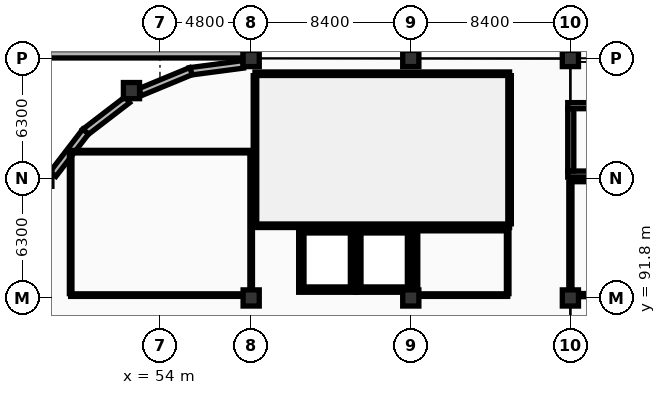
"""IFC4 building model, lengths in metres.
Left out: names, types, materials, properties, quantities, classifications, styles, units other than length and angle.
Written with IfcOpenShell. Run it as: python <this file> out.ifc"""

import sys

from ifc_helpers import new_model, si_unit, direction, frame, frame_2d, origin, origin_2d, place, context, subcontext, project, spatial, rectangle, circle, extrude, element, fill, save


model = new_model("IFC4")
c1 = context("Model", 3, precision=1e-05, world=origin(), true_north=direction((0.0, 1.0)))
c2 = subcontext(c1, "Body", "Model", "MODEL_VIEW")
j1 = project(units=[si_unit("LENGTHUNIT", "METRE"), si_unit("PLANEANGLEUNIT", "RADIAN")], contexts=[c1])
p1 = place(None, origin())
s1 = spatial("IfcSite", under=j1, at=p1, CompositionType="ELEMENT")
p2 = place(p1, origin())
s2 = spatial("IfcBuilding", under=s1, at=p2, CompositionType="ELEMENT")
p3 = place(p2, frame((0.0, 0.0, 5.4)))
s3 = spatial("IfcBuildingStorey", under=s2, at=p3, CompositionType="ELEMENT", Elevation=5.4)
for number, where, z_axis, x_axis in (
    (1, (58.8, 91.8, 0.0), (0.0, 0.0, 1.0), (1.0, 0.0, 0.0)),
    (2, (58.8, 104.4, 0.0), (0.0, 0.0, 1.0), (1.0, 0.0, 0.0)),
    (3, (67.2, 91.8, 0.0), (0.0, 0.0, 1.0), (1.0, 0.0, 0.0)),
    (4, (67.2, 104.4, 0.0), (0.0, 0.0, 1.0), (1.0, 0.0, 0.0)),
    (5, (75.6, 91.8, 0.0), (0.0, 0.0, 1.0), (1.0, 0.0, 0.0)),
    (6, (75.6, 104.4, 0.0), (0.0, 0.0, 1.0), (1.0, 0.0, 0.0)),
):
    element("IfcColumn", number, at=place(p3, frame(where, z_axis=z_axis, x_axis=x_axis)), inside=s3, PredefinedType="COLUMN", context=c2, shape_type="SweptSolid", body=[
        extrude(rectangle(XDim=0.85, YDim=0.85, at=origin_2d()), origin(), (0.0, 0.0, 1.0), 4.5),
    ])
for number, where, z_axis, x_axis in (
    (7, (52.5, 102.712, 0.0), (0.0, 0.0, 1.0), (1.0, 0.0, 0.0)),
    (8, (47.888, 98.1, 0.0), (0.0, 0.0, 1.0), (1.0, 0.0, 0.0)),
):
    element("IfcColumn", number, at=place(p3, frame(where, z_axis=z_axis, x_axis=x_axis)), inside=s3, PredefinedType="COLUMN", context=c2, shape_type="SweptSolid", body=[
        extrude(circle(Radius=0.425, at=origin_2d()), origin(), (0.0, 0.0, 1.0), 4.5),
    ])
p4 = place(p3, frame((58.383, 104.65, 0.0), z_axis=(0.0, 0.0, 1.0), x_axis=(-1.0, 0.0, 0.0)))
e9 = element("IfcWall", 9, at=p4, inside=s3, PredefinedType="STANDARD", context=c2, shape_type="SweptSolid", body=[
    extrude(rectangle(XDim=11.683, YDim=0.44, at=frame_2d((5.842, 0.0))), origin(), (0.0, 0.0, 1.0), 3.32),
])
p5 = place(p4, frame((2.658, 0.0, 0.9)))
e10 = element("IfcOpeningElement", 10, at=p5, cuts=e9, PredefinedType="OPENING", context=c2, shape_type="SweptSolid", body=[
    extrude(rectangle(XDim=1.2, YDim=1.85, at=frame_2d((0.6, 0.925))), frame((0.0, 0.23, 0.0), z_axis=(0.0, -1.0, 0.0), x_axis=(1.0, 0.0, 0.0)), (0.0, 0.0, 1.0), 0.46),
])
p6 = place(p4, frame((7.908, 0.0, 0.9)))
e11 = element("IfcOpeningElement", 11, at=p6, cuts=e9, PredefinedType="OPENING", context=c2, shape_type="SweptSolid", body=[
    extrude(rectangle(XDim=1.2, YDim=1.85, at=frame_2d((0.6, 0.925))), frame((0.0, 0.23, 0.0), z_axis=(0.0, -1.0, 0.0), x_axis=(1.0, 0.0, 0.0)), (0.0, 0.0, 1.0), 0.46),
])
p7 = place(p3, frame((58.372, 104.091, 0.0), z_axis=(0.0, 0.0, 1.0), x_axis=(-0.991455178228, -0.130447803989, 0.0)))
e12 = element("IfcWall", 12, at=p7, inside=s3, PredefinedType="ELEMENTEDWALL", context=c2, shape_type="SweptSolid", body=[
    extrude(rectangle(XDim=2.824, YDim=0.395, at=frame_2d((1.412, 0.0))), origin(), (0.0, 0.0, 1.0), 3.37),
])
p8 = place(p7, frame((0.962, 0.0, 0.85)))
e13 = element("IfcOpeningElement", 13, at=p8, cuts=e12, PredefinedType="OPENING", context=c2, shape_type="SweptSolid", body=[
    extrude(rectangle(XDim=0.9, YDim=1.85, at=frame_2d((0.45, 0.925))), frame((0.0, 0.208, 0.0), z_axis=(0.0, -1.0, 0.0), x_axis=(1.0, 0.0, 0.0)), (0.0, 0.0, 1.0), 0.415),
])
p9 = place(p3, frame((55.635, 103.74, 0.0), z_axis=(0.0, 0.0, 1.0), x_axis=(-0.923866622923, -0.382714597381, 0.0)))
e14 = element("IfcWall", 14, at=p9, inside=s3, PredefinedType="ELEMENTEDWALL", context=c2, shape_type="SweptSolid", body=[
    extrude(rectangle(XDim=2.892, YDim=0.395, at=frame_2d((1.446, 0.0))), origin(), (0.0, 0.0, 1.0), 3.27),
])
p10 = place(p9, frame((0.962, 0.0, 0.85)))
e15 = element("IfcOpeningElement", 15, at=p10, cuts=e14, PredefinedType="OPENING", context=c2, shape_type="SweptSolid", body=[
    extrude(rectangle(XDim=0.9, YDim=1.85, at=frame_2d((0.45, 0.925))), frame((0.0, 0.208, 0.0), z_axis=(0.0, -1.0, 0.0), x_axis=(1.0, 0.0, 0.0)), (0.0, 0.0, 1.0), 0.415),
])
p11 = place(p3, frame((52.283, 102.23, 0.0), z_axis=(0.0, 0.0, 1.0), x_axis=(-0.793343310116, -0.608774500364, 0.0)))
e16 = element("IfcWall", 16, at=p11, inside=s3, PredefinedType="ELEMENTEDWALL", context=c2, shape_type="SweptSolid", body=[
    extrude(rectangle(XDim=2.824, YDim=0.395, at=frame_2d((1.412, 0.0))), origin(), (0.0, 0.0, 1.0), 3.27),
])
p12 = place(p11, frame((0.962, 0.0, 0.85)))
e17 = element("IfcOpeningElement", 17, at=p12, cuts=e16, PredefinedType="OPENING", context=c2, shape_type="SweptSolid", body=[
    extrude(rectangle(XDim=0.9, YDim=1.85, at=frame_2d((0.45, 0.925))), frame((0.0, 0.208, 0.0), z_axis=(0.0, -1.0, 0.0), x_axis=(1.0, 0.0, 0.0)), (0.0, 0.0, 1.0), 0.415),
])
p13 = place(p3, frame((50.089, 100.557, 0.0), z_axis=(0.0, 0.0, 1.0), x_axis=(-0.608787157184, -0.793333597705, 0.0)))
e18 = element("IfcWall", 18, at=p13, inside=s3, PredefinedType="ELEMENTEDWALL", context=c2, shape_type="SweptSolid", body=[
    extrude(rectangle(XDim=2.824, YDim=0.395, at=frame_2d((1.412, 0.0))), origin(), (0.0, 0.0, 1.0), 3.37),
])
for number, where, z_axis, x_axis in (
    (19, (75.46, 101.92, 0.0), (0.0, 0.0, 1.0), (1.0, 0.0, 0.0)),
    (20, (84.54, 98.32, 0.0), (0.0, 0.0, 1.0), (-1.0, 0.0, 0.0)),
):
    element("IfcWall", number, at=place(p3, frame(where, z_axis=z_axis, x_axis=x_axis)), inside=s3, PredefinedType="SHEAR", context=c2, shape_type="SweptSolid", body=[
        extrude(rectangle(XDim=9.08, YDim=0.32, at=frame_2d((4.54, 0.0))), origin(), (0.0, 0.0, 1.0), 4.24),
    ])
p14 = place(p3, frame((75.62, 98.48, 0.0), z_axis=(0.0, 0.0, 1.0), x_axis=(0.0, 1.0, 0.0)))
e21 = element("IfcWall", 21, at=p14, inside=s3, PredefinedType="SHEAR", context=c2, shape_type="SweptSolid", body=[
    extrude(rectangle(XDim=3.28, YDim=0.32, at=frame_2d((1.64, 0.0))), origin(), (0.0, 0.0, 1.0), 4.24),
])
p15 = place(p14, frame((1.065, 0.0, 0.0)))
e22 = element("IfcOpeningElement", 22, at=p15, cuts=e21, PredefinedType="OPENING", context=c2, shape_type="SweptSolid", body=[
    extrude(rectangle(XDim=1.15, YDim=2.2, at=frame_2d((0.575, 1.1))), frame((0.0, 0.17, 0.0), z_axis=(0.0, -1.0, 0.0), x_axis=(1.0, 0.0, 0.0)), (0.0, 0.0, 1.0), 0.34),
])
p16 = place(p3, frame((61.3, 95.36, 0.0), z_axis=(0.0, 0.0, 1.0), x_axis=(1.0, 0.0, 0.0)))
e23 = element("IfcWall", 23, at=p16, inside=s3, PredefinedType="SHEAR", context=c2, shape_type="SweptSolid", body=[
    extrude(rectangle(XDim=3.0, YDim=0.28, at=frame_2d((1.5, 0.0))), origin(), (0.0, 0.0, 1.0), 4.24),
])
p17 = place(p3, frame((64.3, 92.24, 0.0), z_axis=(0.0, 0.0, 1.0), x_axis=(-1.0, 0.0, 0.0)))
e24 = element("IfcWall", 24, at=p17, inside=s3, PredefinedType="SHEAR", context=c2, shape_type="SweptSolid", body=[
    extrude(rectangle(XDim=3.0, YDim=0.28, at=frame_2d((1.5, 0.0))), origin(), (0.0, 0.0, 1.0), 4.24),
])
p18 = place(p17, frame((0.975, 0.0, 0.0)))
e25 = element("IfcOpeningElement", 25, at=p18, cuts=e24, PredefinedType="OPENING", context=c2, shape_type="SweptSolid", body=[
    extrude(rectangle(XDim=1.05, YDim=2.2, at=frame_2d((0.525, 1.1))), frame((0.0, 0.15, 0.0), z_axis=(0.0, -1.0, 0.0), x_axis=(1.0, 0.0, 0.0)), (0.0, 0.0, 1.0), 0.3),
])
for number, where, z_axis, x_axis in (
    (26, (61.44, 92.38, 0.0), (0.0, 0.0, 1.0), (0.0, 1.0, 0.0)),
    (27, (64.16, 95.22, 0.0), (0.0, 0.0, 1.0), (0.0, -1.0, 0.0)),
):
    element("IfcWall", number, at=place(p3, frame(where, z_axis=z_axis, x_axis=x_axis)), inside=s3, PredefinedType="SHEAR", context=c2, shape_type="SweptSolid", body=[
        extrude(rectangle(XDim=2.84, YDim=0.28, at=frame_2d((1.42, 0.0))), origin(), (0.0, 0.0, 1.0), 4.24),
    ])
p19 = place(p3, frame((64.3, 95.36, 0.0), z_axis=(0.0, 0.0, 1.0), x_axis=(1.0, 0.0, 0.0)))
e28 = element("IfcWall", 28, at=p19, inside=s3, PredefinedType="SHEAR", context=c2, shape_type="SweptSolid", body=[
    extrude(rectangle(XDim=3.0, YDim=0.28, at=frame_2d((1.5, 0.0))), origin(), (0.0, 0.0, 1.0), 4.24),
])
p20 = place(p3, frame((67.3, 92.24, 0.0), z_axis=(0.0, 0.0, 1.0), x_axis=(-1.0, 0.0, 0.0)))
e29 = element("IfcWall", 29, at=p20, inside=s3, PredefinedType="SHEAR", context=c2, shape_type="SweptSolid", body=[
    extrude(rectangle(XDim=3.0, YDim=0.28, at=frame_2d((1.5, 0.0))), origin(), (0.0, 0.0, 1.0), 4.24),
])
p21 = place(p20, frame((0.975, 0.0, 0.0)))
e30 = element("IfcOpeningElement", 30, at=p21, cuts=e29, PredefinedType="OPENING", context=c2, shape_type="SweptSolid", body=[
    extrude(rectangle(XDim=1.05, YDim=2.2, at=frame_2d((0.525, 1.1))), frame((0.0, 0.15, 0.0), z_axis=(0.0, -1.0, 0.0), x_axis=(1.0, 0.0, 0.0)), (0.0, 0.0, 1.0), 0.3),
])
for number, where, z_axis, x_axis in (
    (31, (64.44, 92.38, 0.0), (0.0, 0.0, 1.0), (0.0, 1.0, 0.0)),
    (32, (67.16, 95.22, 0.0), (0.0, 0.0, 1.0), (0.0, -1.0, 0.0)),
):
    element("IfcWall", number, at=place(p3, frame(where, z_axis=z_axis, x_axis=x_axis)), inside=s3, PredefinedType="SHEAR", context=c2, shape_type="SweptSolid", body=[
        extrude(rectangle(XDim=2.84, YDim=0.28, at=frame_2d((1.42, 0.0))), origin(), (0.0, 0.0, 1.0), 4.24),
    ])
for number, where, z_axis, x_axis in (
    (33, (59.0, 103.6, 0.0), (0.0, 0.0, 1.0), (1.0, 0.0, 0.0)),
    (34, (72.4, 95.6, 0.0), (0.0, 0.0, 1.0), (-1.0, 0.0, 0.0)),
):
    element("IfcWall", number, at=place(p3, frame(where, z_axis=z_axis, x_axis=x_axis)), inside=s3, PredefinedType="PARTITIONING", context=c2, shape_type="SweptSolid", body=[
        extrude(rectangle(XDim=13.4, YDim=0.185, at=frame_2d((6.7, 0.0))), origin(), (0.0, 0.0, 1.0), 3.37),
    ])
p22 = place(p3, frame((59.0, 95.702, 0.0), z_axis=(0.0, 0.0, 1.0), x_axis=(0.0, 1.0, 0.0)))
e35 = element("IfcWall", 35, at=p22, inside=s3, PredefinedType="PARTITIONING", context=c2, shape_type="SweptSolid", body=[
    extrude(rectangle(XDim=7.795, YDim=0.185, at=frame_2d((3.897, 0.0))), origin(), (0.0, 0.0, 1.0), 3.37),
])
p23 = place(p3, frame((72.4, 103.498, 0.0), z_axis=(0.0, 0.0, 1.0), x_axis=(0.0, -1.0, 0.0)))
e36 = element("IfcWall", 36, at=p23, inside=s3, PredefinedType="PARTITIONING", context=c2, shape_type="SweptSolid", body=[
    extrude(rectangle(XDim=7.795, YDim=0.185, at=frame_2d((3.897, 0.0))), origin(), (0.0, 0.0, 1.0), 3.62),
])
p24 = place(p23, frame((2.133, 0.0, 0.0)))
e37 = element("IfcOpeningElement", 37, at=p24, cuts=e36, PredefinedType="OPENING", context=c2, shape_type="SweptSolid", body=[
    extrude(rectangle(XDim=2.0, YDim=2.5, at=frame_2d((1.0, 1.25))), frame((0.0, 0.103, 0.0), z_axis=(0.0, -1.0, 0.0), x_axis=(1.0, 0.0, 0.0)), (0.0, 0.0, 1.0), 0.205),
])
p25 = place(p3, frame((67.5, 95.4, 0.0), z_axis=(0.0, 0.0, 1.0), x_axis=(1.0, 0.0, 0.0)))
e38 = element("IfcWall", 38, at=p25, inside=s3, PredefinedType="PARTITIONING", context=c2, shape_type="SweptSolid", body=[
    extrude(rectangle(XDim=4.8, YDim=0.135, at=frame_2d((2.4, 0.0))), origin(), (0.0, 0.0, 1.0), 3.37),
])
p26 = place(p3, frame((72.3, 91.95, 0.0), z_axis=(0.0, 0.0, 1.0), x_axis=(-1.0, 0.0, 0.0)))
e39 = element("IfcWall", 39, at=p26, inside=s3, PredefinedType="PARTITIONING", context=c2, shape_type="SweptSolid", body=[
    extrude(rectangle(XDim=4.8, YDim=0.135, at=frame_2d((2.4, 0.0))), origin(), (0.0, 0.0, 1.0), 3.37),
])
p27 = place(p26, frame((1.61, 0.0, 0.0)))
e40 = element("IfcOpeningElement", 40, at=p27, cuts=e39, PredefinedType="OPENING", context=c2, shape_type="SweptSolid", body=[
    extrude(rectangle(XDim=0.95, YDim=2.15, at=frame_2d((0.475, 1.075))), frame((0.0, 0.077, 0.0), z_axis=(0.0, -1.0, 0.0), x_axis=(1.0, 0.0, 0.0)), (0.0, 0.0, 1.0), 0.155),
])
p28 = place(p3, frame((67.5, 92.028, 0.0), z_axis=(0.0, 0.0, 1.0), x_axis=(0.0, 1.0, 0.0)))
e41 = element("IfcWall", 41, at=p28, inside=s3, PredefinedType="PARTITIONING", context=c2, shape_type="SweptSolid", body=[
    extrude(rectangle(XDim=3.295, YDim=0.135, at=frame_2d((1.647, 0.0))), origin(), (0.0, 0.0, 1.0), 3.37),
])
p29 = place(p3, frame((72.3, 95.323, 0.0), z_axis=(0.0, 0.0, 1.0), x_axis=(0.0, -1.0, 0.0)))
e42 = element("IfcWall", 42, at=p29, inside=s3, PredefinedType="PARTITIONING", context=c2, shape_type="SweptSolid", body=[
    extrude(rectangle(XDim=3.295, YDim=0.135, at=frame_2d((1.647, 0.0))), origin(), (0.0, 0.0, 1.0), 3.57),
])
p30 = place(p3, frame((75.6, 98.0, 0.0), z_axis=(0.0, 0.0, 1.0), x_axis=(1.0, 0.0, 0.0)))
e43 = element("IfcWall", 43, at=p30, inside=s3, PredefinedType="PARTITIONING", context=c2, shape_type="SweptSolid", body=[
    extrude(rectangle(XDim=8.8, YDim=0.165, at=frame_2d((4.4, 0.0))), origin(), (0.0, 0.0, 1.0), 3.37),
])
p31 = place(p3, frame((84.4, 91.95, 0.0), z_axis=(0.0, 0.0, 1.0), x_axis=(-1.0, 0.0, 0.0)))
e44 = element("IfcWall", 44, at=p31, inside=s3, PredefinedType="PARTITIONING", context=c2, shape_type="SweptSolid", body=[
    extrude(rectangle(XDim=8.8, YDim=0.165, at=frame_2d((4.4, 0.0))), origin(), (0.0, 0.0, 1.0), 3.37),
])
p32 = place(p31, frame((3.545, 0.0, 0.0)))
e45 = element("IfcOpeningElement", 45, at=p32, cuts=e44, PredefinedType="OPENING", context=c2, shape_type="SweptSolid", body=[
    extrude(rectangle(XDim=1.0, YDim=2.15, at=frame_2d((0.5, 1.075))), frame((0.0, 0.093, 0.0), z_axis=(0.0, -1.0, 0.0), x_axis=(1.0, 0.0, 0.0)), (0.0, 0.0, 1.0), 0.185),
])
p33 = place(p3, frame((75.6, 92.042, 0.0), z_axis=(0.0, 0.0, 1.0), x_axis=(0.0, 1.0, 0.0)))
e46 = element("IfcWall", 46, at=p33, inside=s3, PredefinedType="PARTITIONING", context=c2, shape_type="SweptSolid", body=[
    extrude(rectangle(XDim=5.865, YDim=0.165, at=frame_2d((2.933, 0.0))), origin(), (0.0, 0.0, 1.0), 3.37),
])
p34 = place(p3, frame((49.3, 99.5, 0.0), z_axis=(0.0, 0.0, 1.0), x_axis=(1.0, 0.0, 0.0)))
e47 = element("IfcWall", 47, at=p34, inside=s3, PredefinedType="PARTITIONING", context=c2, shape_type="SweptSolid", body=[
    extrude(rectangle(XDim=9.5, YDim=0.135, at=frame_2d((4.75, 0.0))), origin(), (0.0, 0.0, 1.0), 3.27),
])
p35 = place(p3, frame((58.8, 91.95, 0.0), z_axis=(0.0, 0.0, 1.0), x_axis=(-1.0, 0.0, 0.0)))
e48 = element("IfcWall", 48, at=p35, inside=s3, PredefinedType="PARTITIONING", context=c2, shape_type="SweptSolid", body=[
    extrude(rectangle(XDim=9.5, YDim=0.135, at=frame_2d((4.75, 0.0))), origin(), (0.0, 0.0, 1.0), 3.27),
])
p36 = place(p35, frame((3.073, 0.0, 0.0)))
e49 = element("IfcOpeningElement", 49, at=p36, cuts=e48, PredefinedType="OPENING", context=c2, shape_type="SweptSolid", body=[
    extrude(rectangle(XDim=1.02, YDim=2.15, at=frame_2d((0.51, 1.075))), frame((0.0, 0.077, 0.0), z_axis=(0.0, -1.0, 0.0), x_axis=(1.0, 0.0, 0.0)), (0.0, 0.0, 1.0), 0.155),
])
for number, where, z_axis, x_axis in (
    (50, (49.3, 92.028, 0.0), (0.0, 0.0, 1.0), (0.0, 1.0, 0.0)),
    (51, (58.8, 99.423, 0.0), (0.0, 0.0, 1.0), (0.0, -1.0, 0.0)),
):
    element("IfcWall", number, at=place(p3, frame(where, z_axis=z_axis, x_axis=x_axis)), inside=s3, PredefinedType="PARTITIONING", context=c2, shape_type="SweptSolid", body=[
        extrude(rectangle(XDim=7.395, YDim=0.135, at=frame_2d((3.698, 0.0))), origin(), (0.0, 0.0, 1.0), 3.37),
    ])
p37 = place(p5, origin())
e52 = element("IfcWindow", 52, at=p37, inside=s3, PartitioningType="SINGLE_PANEL", PredefinedType="WINDOW", context=c2, shape_type="SweptSolid", body=[
    extrude(rectangle(XDim=1.2, YDim=1.85, at=frame_2d((0.6, 0.925))), frame((0.0, 0.03, 0.0), z_axis=(0.0, -1.0, 0.0), x_axis=(1.0, 0.0, 0.0)), (0.0, 0.0, 1.0), 0.06),
])
fill(e10, e52)
p38 = place(p6, origin())
e53 = element("IfcWindow", 53, at=p38, inside=s3, PartitioningType="SINGLE_PANEL", PredefinedType="WINDOW", context=c2, shape_type="SweptSolid", body=[
    extrude(rectangle(XDim=1.2, YDim=1.85, at=frame_2d((0.6, 0.925))), frame((0.0, 0.03, 0.0), z_axis=(0.0, -1.0, 0.0), x_axis=(1.0, 0.0, 0.0)), (0.0, 0.0, 1.0), 0.06),
])
fill(e11, e53)
p39 = place(p8, origin())
e54 = element("IfcWindow", 54, at=p39, inside=s3, PartitioningType="SINGLE_PANEL", PredefinedType="WINDOW", context=c2, shape_type="SweptSolid", body=[
    extrude(rectangle(XDim=0.9, YDim=1.85, at=frame_2d((0.45, 0.925))), frame((0.0, 0.03, 0.0), z_axis=(0.0, -1.0, 0.0), x_axis=(1.0, 0.0, 0.0)), (0.0, 0.0, 1.0), 0.06),
])
fill(e13, e54)
p40 = place(p10, origin())
e55 = element("IfcWindow", 55, at=p40, inside=s3, PartitioningType="SINGLE_PANEL", PredefinedType="WINDOW", context=c2, shape_type="SweptSolid", body=[
    extrude(rectangle(XDim=0.9, YDim=1.85, at=frame_2d((0.45, 0.925))), frame((0.0, 0.03, 0.0), z_axis=(0.0, -1.0, 0.0), x_axis=(1.0, 0.0, 0.0)), (0.0, 0.0, 1.0), 0.06),
])
fill(e15, e55)
p41 = place(p12, origin())
e56 = element("IfcWindow", 56, at=p41, inside=s3, PartitioningType="SINGLE_PANEL", PredefinedType="WINDOW", context=c2, shape_type="SweptSolid", body=[
    extrude(rectangle(XDim=0.9, YDim=1.85, at=frame_2d((0.45, 0.925))), frame((0.0, 0.03, 0.0), z_axis=(0.0, -1.0, 0.0), x_axis=(1.0, 0.0, 0.0)), (0.0, 0.0, 1.0), 0.06),
])
fill(e17, e56)
p42 = place(p15, origin())
e57 = element("IfcDoor", 57, at=p42, inside=s3, OperationType="SINGLE_SWING_RIGHT", PredefinedType="DOOR", context=c2, shape_type="SweptSolid", body=[
    extrude(rectangle(XDim=1.15, YDim=2.2, at=frame_2d((0.575, 1.1))), frame((0.0, 0.025, 0.0), z_axis=(0.0, -1.0, 0.0), x_axis=(1.0, 0.0, 0.0)), (0.0, 0.0, 1.0), 0.05),
])
fill(e22, e57)
p43 = place(p18, origin())
e58 = element("IfcDoor", 58, at=p43, inside=s3, OperationType="DOUBLE_DOOR_SLIDING", PredefinedType="DOOR", context=c2, shape_type="SweptSolid", body=[
    extrude(rectangle(XDim=1.05, YDim=2.2, at=frame_2d((0.525, 1.1))), frame((0.0, 0.025, 0.0), z_axis=(0.0, -1.0, 0.0), x_axis=(1.0, 0.0, 0.0)), (0.0, 0.0, 1.0), 0.05),
])
fill(e25, e58)
p44 = place(p21, origin())
e59 = element("IfcDoor", 59, at=p44, inside=s3, OperationType="DOUBLE_DOOR_SLIDING", PredefinedType="DOOR", context=c2, shape_type="SweptSolid", body=[
    extrude(rectangle(XDim=1.05, YDim=2.2, at=frame_2d((0.525, 1.1))), frame((0.0, 0.025, 0.0), z_axis=(0.0, -1.0, 0.0), x_axis=(1.0, 0.0, 0.0)), (0.0, 0.0, 1.0), 0.05),
])
fill(e30, e59)
p45 = place(p24, origin())
e60 = element("IfcDoor", 60, at=p45, inside=s3, OperationType="DOUBLE_DOOR_SINGLE_SWING", PredefinedType="DOOR", context=c2, shape_type="SweptSolid", body=[
    extrude(rectangle(XDim=2.0, YDim=2.5, at=frame_2d((1.0, 1.25))), frame((0.0, 0.025, 0.0), z_axis=(0.0, -1.0, 0.0), x_axis=(1.0, 0.0, 0.0)), (0.0, 0.0, 1.0), 0.05),
])
fill(e37, e60)
p46 = place(p27, origin())
e61 = element("IfcDoor", 61, at=p46, inside=s3, OperationType="SINGLE_SWING_RIGHT", PredefinedType="DOOR", context=c2, shape_type="SweptSolid", body=[
    extrude(rectangle(XDim=0.95, YDim=2.15, at=frame_2d((0.475, 1.075))), frame((0.0, 0.025, 0.0), z_axis=(0.0, -1.0, 0.0), x_axis=(1.0, 0.0, 0.0)), (0.0, 0.0, 1.0), 0.05),
])
fill(e40, e61)
p47 = place(p36, origin())
e62 = element("IfcDoor", 62, at=p47, inside=s3, OperationType="SINGLE_SWING_LEFT", PredefinedType="DOOR", context=c2, shape_type="SweptSolid", body=[
    extrude(rectangle(XDim=1.02, YDim=2.15, at=frame_2d((0.51, 1.075))), frame((0.0, 0.025, 0.0), z_axis=(0.0, -1.0, 0.0), x_axis=(1.0, 0.0, 0.0)), (0.0, 0.0, 1.0), 0.05),
])
fill(e49, e62)
save(model, sys.argv[1])
